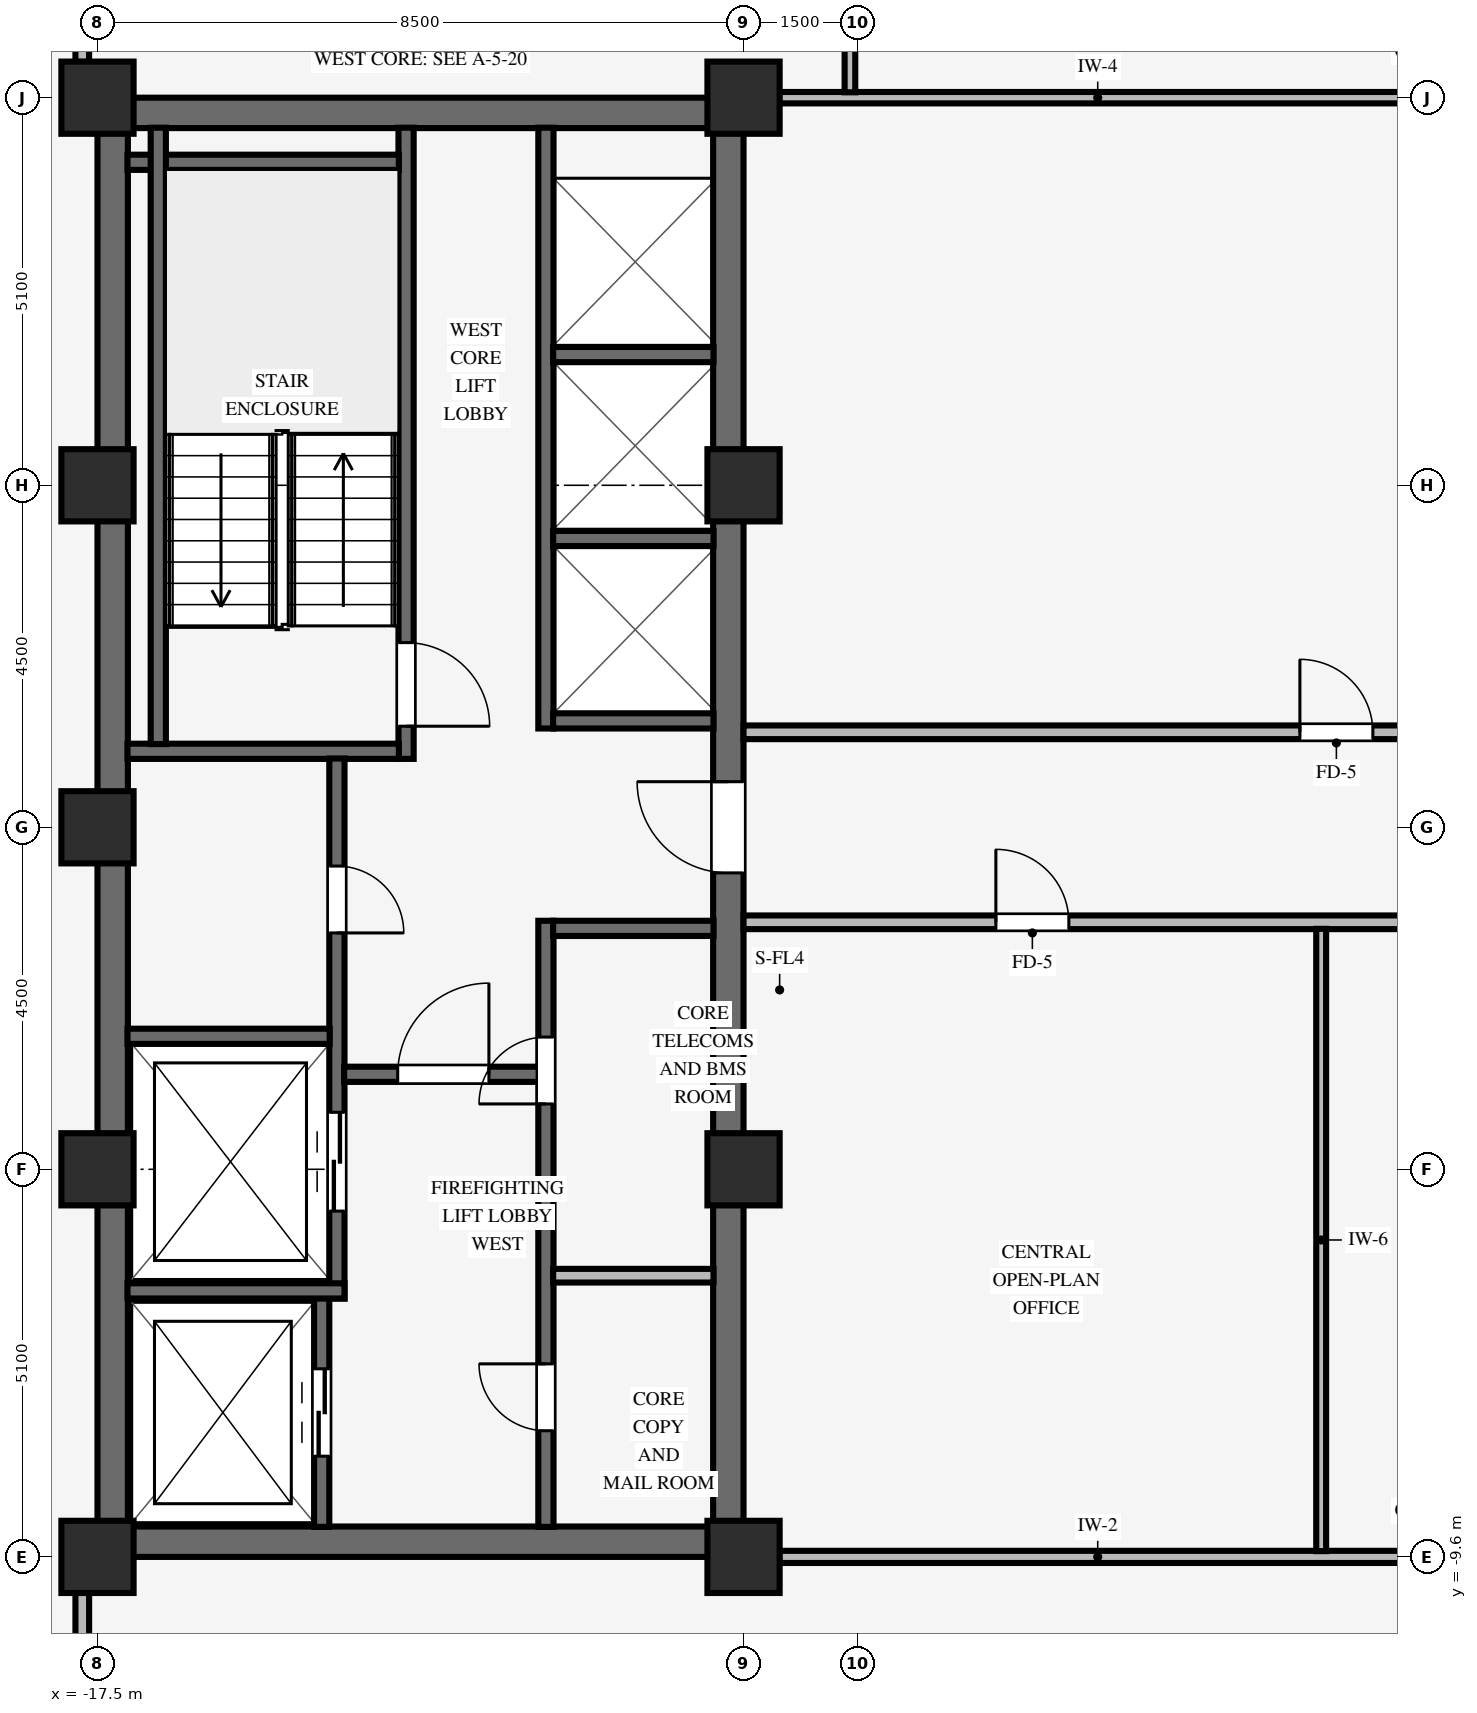
"""IFC4 building model, lengths in metres.
Left out: names, types, materials, properties, quantities, classifications, styles, units other than length and angle.
Written with IfcOpenShell. Run it as: python <this file> out.ifc"""

import sys

from ifc_helpers import new_model, si_unit, direction, frame, frame_2d, origin, origin_2d, place, context, subcontext, project, spatial, rectangle, extrude, source, transform, mapped, element, fill, save


model = new_model("IFC4")
c1 = context("Model", 3, precision=1e-05, world=origin(), true_north=direction((0.0, 1.0)))
c2 = subcontext(c1, "Body", "Model", "MODEL_VIEW")
j1 = project(units=[si_unit("LENGTHUNIT", "METRE"), si_unit("PLANEANGLEUNIT", "RADIAN")], contexts=[c1])
p1 = place(None, origin())
s1 = spatial("IfcSite", under=j1, at=p1, CompositionType="ELEMENT")
p2 = place(p1, origin())
s2 = spatial("IfcBuilding", under=s1, at=p2, CompositionType="ELEMENT")
p3 = place(p2, frame((0.0, 0.0, 171.3)))
s3 = spatial("IfcBuildingStorey", under=s2, at=p3, CompositionType="ELEMENT", Elevation=171.3)
for number, where, z_axis, x_axis in (
    (1, (-17.5, -9.4, 0.0), (0.0, 0.0, 1.0), (1.0, 0.0, 0.0)),
    (2, (-17.5, 9.4, 0.0), (0.0, 0.0, 1.0), (1.0, 0.0, 0.0)),
):
    element("IfcWall", number, at=place(p3, frame(where, z_axis=z_axis, x_axis=x_axis)), inside=s3, PredefinedType="SHEAR", context=c2, shape_type="SweptSolid", body=[
        extrude(rectangle(XDim=8.5, YDim=0.4, at=frame_2d((4.25, 0.0))), origin(), (0.0, 0.0, 1.0), 3.37),
    ])
p4 = place(p3, frame((-17.3, -9.205, 0.0), z_axis=(0.0, 0.0, 1.0), x_axis=(0.0, 1.0, 0.0)))
e3 = element("IfcWall", 3, at=p4, inside=s3, PredefinedType="SHEAR", context=c2, shape_type="SweptSolid", body=[
    extrude(rectangle(XDim=18.41, YDim=0.4, at=frame_2d((9.205, 0.0))), origin(), (0.0, 0.0, 1.0), 3.37),
])
p5 = place(p3, frame((-9.2, -9.205, 0.0), z_axis=(0.0, 0.0, 1.0), x_axis=(0.0, 1.0, 0.0)))
e4 = element("IfcWall", 4, at=p5, inside=s3, PredefinedType="SHEAR", context=c2, shape_type="SweptSolid", body=[
    extrude(rectangle(XDim=18.41, YDim=0.4, at=frame_2d((9.205, 0.0))), origin(), (0.0, 0.0, 1.0), 3.37),
])
p6 = place(p5, frame((8.605, 0.0, 0.0)))
e5 = element("IfcOpeningElement", 5, at=p6, cuts=e4, PredefinedType="OPENING", context=c2, shape_type="SweptSolid", body=[
    extrude(rectangle(XDim=1.2, YDim=2.15, at=frame_2d((0.6, 1.075))), frame((0.0, 0.21, 0.0), z_axis=(0.0, -1.0, 0.0), x_axis=(1.0, 0.0, 0.0)), (0.0, 0.0, 1.0), 0.42),
])
for number, where, z_axis, x_axis in (
    (6, (-17.5, -9.6, 0.0), (0.0, 0.0, 1.0), (1.0, 0.0, 0.0)),
    (7, (-17.5, -4.5, 0.0), (0.0, 0.0, 1.0), (1.0, 0.0, 0.0)),
    (8, (-17.5, 4.5, 0.0), (0.0, 0.0, 1.0), (1.0, 0.0, 0.0)),
    (9, (-17.5, 9.6, 0.0), (0.0, 0.0, 1.0), (1.0, 0.0, 0.0)),
    (10, (-9.0, -9.6, 0.0), (0.0, 0.0, 1.0), (1.0, 0.0, 0.0)),
    (11, (-9.0, -4.5, 0.0), (0.0, 0.0, 1.0), (1.0, 0.0, 0.0)),
    (12, (-9.0, 4.5, 0.0), (0.0, 0.0, 1.0), (1.0, 0.0, 0.0)),
    (13, (-9.0, 9.6, 0.0), (0.0, 0.0, 1.0), (1.0, 0.0, 0.0)),
    (14, (-17.5, 0.0, 0.0), (0.0, 0.0, 1.0), (1.0, 0.0, 0.0)),
):
    element("IfcColumn", number, at=place(p3, frame(where, z_axis=z_axis, x_axis=x_axis)), inside=s3, PredefinedType="COLUMN", context=c2, shape_type="SweptSolid", body=[
        extrude(rectangle(XDim=0.95, YDim=0.95, at=origin_2d()), origin(), (0.0, 0.0, 1.0), 3.37),
    ])
p7 = place(p3, frame((-13.44, 0.9, 0.0), z_axis=(0.0, 0.0, 1.0), x_axis=(0.0, 1.0, 0.0)))
e15 = element("IfcWall", 15, at=p7, inside=s3, PredefinedType="SHEAR", context=c2, shape_type="SweptSolid", body=[
    extrude(rectangle(XDim=8.305, YDim=0.2, at=frame_2d((4.153, 0.0))), origin(), (0.0, 0.0, 1.0), 3.37),
])
p8 = place(p7, frame((1.53, 0.0, 0.0), z_axis=(0.0, 0.0, 1.0), x_axis=(-1.0, 0.0, 0.0)))
e16 = element("IfcOpeningElement", 16, at=p8, cuts=e15, PredefinedType="OPENING", context=c2, shape_type="SweptSolid", body=[
    extrude(rectangle(XDim=1.1, YDim=2.15, at=frame_2d((0.55, 1.075))), frame((0.0, 0.11, 0.0), z_axis=(0.0, -1.0, 0.0), x_axis=(1.0, 0.0, 0.0)), (0.0, 0.0, 1.0), 0.22),
])
for number, where, z_axis, x_axis in (
    (17, (-17.105, 1.0, 0.0), (0.0, 0.0, 1.0), (1.0, 0.0, 0.0)),
    (18, (-17.105, 8.75, 0.0), (0.0, 0.0, 1.0), (1.0, 0.0, 0.0)),
):
    element("IfcWall", number, at=place(p3, frame(where, z_axis=z_axis, x_axis=x_axis)), inside=s3, PredefinedType="SHEAR", context=c2, shape_type="SweptSolid", body=[
        extrude(rectangle(XDim=3.57, YDim=0.2, at=frame_2d((1.785, 0.0))), origin(), (0.0, 0.0, 1.0), 3.37),
    ])
p9 = place(p3, frame((-16.7, 1.095, 0.0), z_axis=(0.0, 0.0, 1.0), x_axis=(0.0, 1.0, 0.0)))
e19 = element("IfcWall", 19, at=p9, inside=s3, PredefinedType="SHEAR", context=c2, shape_type="SweptSolid", body=[
    extrude(rectangle(XDim=8.11, YDim=0.2, at=frame_2d((4.055, 0.0))), origin(), (0.0, 0.0, 1.0), 3.37),
])
p10 = place(p3, frame((-14.55, -9.205, 0.0), z_axis=(0.0, 0.0, 1.0), x_axis=(0.0, 1.0, 0.0)))
e20 = element("IfcWall", 20, at=p10, inside=s3, PredefinedType="SHEAR", context=c2, shape_type="SweptSolid", body=[
    extrude(rectangle(XDim=3.01, YDim=0.2, at=frame_2d((1.505, 0.0))), origin(), (0.0, 0.0, 1.0), 3.37),
])
p11 = place(p10, frame((0.93, 0.0, 0.0)))
e21 = element("IfcOpeningElement", 21, at=p11, cuts=e20, PredefinedType="OPENING", context=c2, shape_type="SweptSolid", body=[
    extrude(rectangle(XDim=1.15, YDim=2.15, at=frame_2d((0.575, 1.075))), frame((0.0, 0.11, 0.0), z_axis=(0.0, -1.0, 0.0), x_axis=(1.0, 0.0, 0.0)), (0.0, 0.0, 1.0), 0.22),
])
p12 = place(p3, frame((-14.35, -6.2, 0.0), z_axis=(0.0, 0.0, 1.0), x_axis=(0.0, 1.0, 0.0)))
e22 = element("IfcWall", 22, at=p12, inside=s3, PredefinedType="SHEAR", context=c2, shape_type="SweptSolid", body=[
    extrude(rectangle(XDim=7.105, YDim=0.2, at=frame_2d((3.552, 0.0))), origin(), (0.0, 0.0, 1.0), 3.37),
])
p13 = place(p12, frame((5.69, 0.0, 0.0), z_axis=(0.0, 0.0, 1.0), x_axis=(-1.0, 0.0, 0.0)))
e23 = element("IfcOpeningElement", 23, at=p13, cuts=e22, PredefinedType="OPENING", context=c2, shape_type="SweptSolid", body=[
    extrude(rectangle(XDim=0.88, YDim=2.1, at=frame_2d((0.44, 1.05))), frame((0.0, 0.11, 0.0), z_axis=(0.0, -1.0, 0.0), x_axis=(1.0, 0.0, 0.0)), (0.0, 0.0, 1.0), 0.22),
])
p14 = place(p12, frame((1.15, 0.0, 0.0)))
e24 = element("IfcOpeningElement", 24, at=p14, cuts=e22, PredefinedType="OPENING", context=c2, shape_type="SweptSolid", body=[
    extrude(rectangle(XDim=1.3, YDim=2.2, at=frame_2d((0.65, 1.1))), frame((0.0, 0.11, 0.0), z_axis=(0.0, -1.0, 0.0), x_axis=(1.0, 0.0, 0.0)), (0.0, 0.0, 1.0), 0.22),
])
p15 = place(p3, frame((-17.105, -6.1, 0.0), z_axis=(0.0, 0.0, 1.0), x_axis=(1.0, 0.0, 0.0)))
e25 = element("IfcWall", 25, at=p15, inside=s3, PredefinedType="SHEAR", context=c2, shape_type="SweptSolid", body=[
    extrude(rectangle(XDim=2.855, YDim=0.2, at=frame_2d((1.427, 0.0))), origin(), (0.0, 0.0, 1.0), 3.37),
])
p16 = place(p3, frame((-17.105, -2.75, 0.0), z_axis=(0.0, 0.0, 1.0), x_axis=(1.0, 0.0, 0.0)))
e26 = element("IfcWall", 26, at=p16, inside=s3, PredefinedType="SHEAR", context=c2, shape_type="SweptSolid", body=[
    extrude(rectangle(XDim=2.66, YDim=0.2, at=frame_2d((1.33, 0.0))), origin(), (0.0, 0.0, 1.0), 3.37),
])
p17 = place(p3, frame((-11.6, -9.205, 0.0), z_axis=(0.0, 0.0, 1.0), x_axis=(0.0, 1.0, 0.0)))
e27 = element("IfcWall", 27, at=p17, inside=s3, PredefinedType="SHEAR", context=c2, shape_type="SweptSolid", body=[
    extrude(rectangle(XDim=7.975, YDim=0.2, at=frame_2d((3.988, 0.0))), origin(), (0.0, 0.0, 1.0), 3.37),
])
p18 = place(p17, frame((1.265, 0.0, 0.0)))
e28 = element("IfcOpeningElement", 28, at=p18, cuts=e27, PredefinedType="OPENING", context=c2, shape_type="SweptSolid", body=[
    extrude(rectangle(XDim=0.88, YDim=2.1, at=frame_2d((0.44, 1.05))), frame((0.0, 0.11, 0.0), z_axis=(0.0, -1.0, 0.0), x_axis=(1.0, 0.0, 0.0)), (0.0, 0.0, 1.0), 0.22),
])
p19 = place(p17, frame((5.565, 0.0, 0.0)))
e29 = element("IfcOpeningElement", 29, at=p19, cuts=e27, PredefinedType="OPENING", context=c2, shape_type="SweptSolid", body=[
    extrude(rectangle(XDim=0.88, YDim=2.1, at=frame_2d((0.44, 1.05))), frame((0.0, 0.11, 0.0), z_axis=(0.0, -1.0, 0.0), x_axis=(1.0, 0.0, 0.0)), (0.0, 0.0, 1.0), 0.22),
])
p20 = place(p3, frame((-14.255, -3.25, 0.0), z_axis=(0.0, 0.0, 1.0), x_axis=(1.0, 0.0, 0.0)))
e30 = element("IfcWall", 30, at=p20, inside=s3, PredefinedType="SHEAR", context=c2, shape_type="SweptSolid", body=[
    extrude(rectangle(XDim=2.56, YDim=0.2, at=frame_2d((1.28, 0.0))), origin(), (0.0, 0.0, 1.0), 3.37),
])
p21 = place(p20, frame((0.705, 0.0, 0.0)))
e31 = element("IfcOpeningElement", 31, at=p21, cuts=e30, PredefinedType="OPENING", context=c2, shape_type="SweptSolid", body=[
    extrude(rectangle(XDim=1.2, YDim=2.15, at=frame_2d((0.6, 1.075))), frame((0.0, 0.11, 0.0), z_axis=(0.0, -1.0, 0.0), x_axis=(1.0, 0.0, 0.0)), (0.0, 0.0, 1.0), 0.22),
])
p22 = place(p3, frame((-11.505, -1.33, 0.0), z_axis=(0.0, 0.0, 1.0), x_axis=(1.0, 0.0, 0.0)))
e32 = element("IfcWall", 32, at=p22, inside=s3, PredefinedType="SHEAR", context=c2, shape_type="SweptSolid", body=[
    extrude(rectangle(XDim=2.11, YDim=0.2, at=frame_2d((1.055, 0.0))), origin(), (0.0, 0.0, 1.0), 3.37),
])
p23 = place(p3, frame((-11.505, -5.9, 0.0), z_axis=(0.0, 0.0, 1.0), x_axis=(1.0, 0.0, 0.0)))
e33 = element("IfcWall", 33, at=p23, inside=s3, PredefinedType="PARTITIONING", context=c2, shape_type="SweptSolid", body=[
    extrude(rectangle(XDim=2.11, YDim=0.18, at=frame_2d((1.055, 0.0))), origin(), (0.0, 0.0, 1.0), 3.36),
])
p24 = place(p3, frame((-11.6, 1.3, 0.0), z_axis=(0.0, 0.0, 1.0), x_axis=(0.0, 1.0, 0.0)))
e34 = element("IfcWall", 34, at=p24, inside=s3, PredefinedType="SHEAR", context=c2, shape_type="SweptSolid", body=[
    extrude(rectangle(XDim=7.905, YDim=0.2, at=frame_2d((3.953, 0.0))), origin(), (0.0, 0.0, 1.0), 3.37),
])
for number, where, z_axis, x_axis in (
    (35, (-11.505, 1.4, 0.0), (0.0, 0.0, 1.0), (1.0, 0.0, 0.0)),
    (36, (-11.505, 3.8, 0.0), (0.0, 0.0, 1.0), (1.0, 0.0, 0.0)),
    (37, (-11.505, 6.22, 0.0), (0.0, 0.0, 1.0), (1.0, 0.0, 0.0)),
):
    element("IfcWall", number, at=place(p3, frame(where, z_axis=z_axis, x_axis=x_axis)), inside=s3, PredefinedType="SHEAR", context=c2, shape_type="SweptSolid", body=[
        extrude(rectangle(XDim=2.11, YDim=0.2, at=frame_2d((1.055, 0.0))), origin(), (0.0, 0.0, 1.0), 3.37),
    ])
p25 = place(p3, frame((-8.529, -9.6, 0.0), z_axis=(0.0, 0.0, 1.0), x_axis=(1.0, 0.0, 0.0)))
e38 = element("IfcWall", 38, at=p25, inside=s3, PredefinedType="PARTITIONING", context=c2, shape_type="SweptSolid", body=[
    extrude(rectangle(XDim=8.378, YDim=0.16, at=frame_2d((4.189, 0.0))), origin(), (0.0, 0.0, 1.0), 2.405),
])
p26 = place(p3, frame((-9.0, -1.25, 0.0), z_axis=(0.0, 0.0, 1.0), x_axis=(1.0, 0.0, 0.0)))
e39 = element("IfcWall", 39, at=p26, inside=s3, PredefinedType="PARTITIONING", context=c2, shape_type="SweptSolid", body=[
    extrude(rectangle(XDim=15.6, YDim=0.18, at=frame_2d((7.8, 0.0))), origin(), (0.0, 0.0, 1.0), 3.36),
])
p27 = place(p26, frame((3.32, 0.0, 0.0)))
e40 = element("IfcOpeningElement", 40, at=p27, cuts=e39, PredefinedType="OPENING", context=c2, shape_type="SweptSolid", body=[
    extrude(rectangle(XDim=0.96, YDim=2.1, at=frame_2d((0.48, 1.05))), frame((0.0, 0.1, 0.0), z_axis=(0.0, -1.0, 0.0), x_axis=(1.0, 0.0, 0.0)), (0.0, 0.0, 1.0), 0.2),
])
p28 = place(p3, frame((-9.0, 1.25, 0.0), z_axis=(0.0, 0.0, 1.0), x_axis=(1.0, 0.0, 0.0)))
e41 = element("IfcWall", 41, at=p28, inside=s3, PredefinedType="PARTITIONING", context=c2, shape_type="SweptSolid", body=[
    extrude(rectangle(XDim=15.6, YDim=0.18, at=frame_2d((7.8, 0.0))), origin(), (0.0, 0.0, 1.0), 3.36),
])
p29 = place(p28, frame((7.32, 0.0, 0.0)))
e42 = element("IfcOpeningElement", 42, at=p29, cuts=e41, PredefinedType="OPENING", context=c2, shape_type="SweptSolid", body=[
    extrude(rectangle(XDim=0.96, YDim=2.1, at=frame_2d((0.48, 1.05))), frame((0.0, 0.1, 0.0), z_axis=(0.0, -1.0, 0.0), x_axis=(1.0, 0.0, 0.0)), (0.0, 0.0, 1.0), 0.2),
])
p30 = place(p3, frame((-8.529, 9.6, 0.0), z_axis=(0.0, 0.0, 1.0), x_axis=(1.0, 0.0, 0.0)))
e43 = element("IfcWall", 43, at=p30, inside=s3, PredefinedType="PARTITIONING", context=c2, shape_type="SweptSolid", body=[
    extrude(rectangle(XDim=8.378, YDim=0.15, at=frame_2d((4.189, 0.0))), origin(), (0.0, 0.0, 1.0), 2.405),
])
for number, where, z_axis, x_axis in (
    (44, (-17.7, -13.414, 0.0), (0.0, 0.0, 1.0), (0.0, 1.0, 0.0)),
    (45, (-17.7, 10.071, 0.0), (0.0, 0.0, 1.0), (0.0, 1.0, 0.0)),
):
    element("IfcWall", number, at=place(p3, frame(where, z_axis=z_axis, x_axis=x_axis)), inside=s3, PredefinedType="PARTITIONING", context=c2, shape_type="SweptSolid", body=[
        extrude(rectangle(XDim=3.343, YDim=0.18, at=frame_2d((1.671, 0.0))), origin(), (0.0, 0.0, 1.0), 2.816),
    ])
p31 = place(p3, frame((-7.6, 9.671, 0.0), z_axis=(0.0, 0.0, 1.0), x_axis=(0.0, 1.0, 0.0)))
e46 = element("IfcWall", 46, at=p31, inside=s3, PredefinedType="PARTITIONING", context=c2, shape_type="SweptSolid", body=[
    extrude(rectangle(XDim=3.743, YDim=0.14, at=frame_2d((1.872, 0.0))), origin(), (0.0, 0.0, 1.0), 3.36),
])
p32 = place(p3, frame((-1.4, -9.524, 0.0), z_axis=(0.0, 0.0, 1.0), x_axis=(0.0, 1.0, 0.0)))
e47 = element("IfcWall", 47, at=p32, inside=s3, PredefinedType="PARTITIONING", context=c2, shape_type="SweptSolid", body=[
    extrude(rectangle(XDim=8.188, YDim=0.13, at=frame_2d((4.094, 0.0))), origin(), (0.0, 0.0, 1.0), 3.36),
])
m1 = source(origin(), c2, "Body", "SweptSolid", [
    extrude(rectangle(XDim=1.1, YDim=2.15, at=frame_2d((0.55, 1.075))), frame((0.0, 0.025, 0.0), z_axis=(0.0, -1.0, 0.0), x_axis=(1.0, 0.0, 0.0)), (0.0, 0.0, 1.0), 0.05),
])
p33 = place(p8, origin())
e48 = element("IfcDoor", 48, at=p33, inside=s3, OperationType="SINGLE_SWING_RIGHT", PredefinedType="DOOR", context=c2, shape_type="MappedRepresentation", body=[
    mapped(m1, transform((0.0, 0.0, 0.0), scale=1.0)),
])
fill(e16, e48)
m2 = source(origin(), c2, "Body", "SweptSolid", [
    extrude(rectangle(XDim=0.88, YDim=2.1, at=frame_2d((0.44, 1.05))), frame((0.0, 0.025, 0.0), z_axis=(0.0, -1.0, 0.0), x_axis=(1.0, 0.0, 0.0)), (0.0, 0.0, 1.0), 0.05),
])
p34 = place(p13, origin())
e49 = element("IfcDoor", 49, at=p34, inside=s3, OperationType="SINGLE_SWING_RIGHT", PredefinedType="DOOR", context=c2, shape_type="MappedRepresentation", body=[
    mapped(m2, transform((0.0, 0.0, 0.0), scale=1.0)),
])
fill(e23, e49)
m3 = source(origin(), c2, "Body", "SweptSolid", [
    extrude(rectangle(XDim=1.2, YDim=2.15, at=frame_2d((0.6, 1.075))), frame((0.0, 0.025, 0.0), z_axis=(0.0, -1.0, 0.0), x_axis=(1.0, 0.0, 0.0)), (0.0, 0.0, 1.0), 0.05),
])
p35 = place(p21, origin())
e50 = element("IfcDoor", 50, at=p35, inside=s3, OperationType="SINGLE_SWING_RIGHT", PredefinedType="DOOR", context=c2, shape_type="MappedRepresentation", body=[
    mapped(m3, transform((0.0, 0.0, 0.0), scale=1.0)),
])
fill(e31, e50)
p36 = place(p18, origin())
e51 = element("IfcDoor", 51, at=p36, inside=s3, OperationType="SINGLE_SWING_RIGHT", PredefinedType="DOOR", context=c2, shape_type="MappedRepresentation", body=[
    mapped(m2, transform((0.0, 0.0, 0.0), scale=1.0)),
])
fill(e28, e51)
p37 = place(p19, origin())
e52 = element("IfcDoor", 52, at=p37, inside=s3, OperationType="SINGLE_SWING_LEFT", PredefinedType="DOOR", context=c2, shape_type="MappedRepresentation", body=[
    mapped(m2, transform((0.0, 0.0, 0.0), scale=1.0)),
])
fill(e29, e52)
p38 = place(p6, origin())
e53 = element("IfcDoor", 53, at=p38, inside=s3, OperationType="SINGLE_SWING_RIGHT", PredefinedType="DOOR", context=c2, shape_type="MappedRepresentation", body=[
    mapped(m3, transform((0.0, 0.0, 0.0), scale=1.0)),
])
fill(e5, e53)
m4 = source(origin(), c2, "Body", "SweptSolid", [
    extrude(rectangle(XDim=1.15, YDim=2.15, at=frame_2d((0.575, 1.075))), frame((0.0, 0.025, 0.0), z_axis=(0.0, -1.0, 0.0), x_axis=(1.0, 0.0, 0.0)), (0.0, 0.0, 1.0), 0.05),
])
p39 = place(p11, origin())
e54 = element("IfcDoor", 54, at=p39, inside=s3, OperationType="DOUBLE_DOOR_SLIDING", PredefinedType="DOOR", context=c2, shape_type="MappedRepresentation", body=[
    mapped(m4, transform((0.0, 0.0, 0.0), scale=1.0)),
])
fill(e21, e54)
m5 = source(origin(), c2, "Body", "SweptSolid", [
    extrude(rectangle(XDim=1.3, YDim=2.2, at=frame_2d((0.65, 1.1))), frame((0.0, 0.025, 0.0), z_axis=(0.0, -1.0, 0.0), x_axis=(1.0, 0.0, 0.0)), (0.0, 0.0, 1.0), 0.05),
])
p40 = place(p14, origin())
e55 = element("IfcDoor", 55, at=p40, inside=s3, OperationType="DOUBLE_DOOR_SLIDING", PredefinedType="DOOR", context=c2, shape_type="MappedRepresentation", body=[
    mapped(m5, transform((0.0, 0.0, 0.0), scale=1.0)),
])
fill(e24, e55)
m6 = source(origin(), c2, "Body", "SweptSolid", [
    extrude(rectangle(XDim=0.96, YDim=2.1, at=frame_2d((0.48, 1.05))), frame((0.0, 0.025, 0.0), z_axis=(0.0, -1.0, 0.0), x_axis=(1.0, 0.0, 0.0)), (0.0, 0.0, 1.0), 0.05),
])
p41 = place(p29, origin())
e56 = element("IfcDoor", 56, at=p41, inside=s3, OperationType="SINGLE_SWING_LEFT", PredefinedType="DOOR", context=c2, shape_type="MappedRepresentation", body=[
    mapped(m6, transform((0.0, 0.0, 0.0), scale=1.0)),
])
fill(e42, e56)
p42 = place(p27, origin())
e57 = element("IfcDoor", 57, at=p42, inside=s3, OperationType="SINGLE_SWING_LEFT", PredefinedType="DOOR", context=c2, shape_type="MappedRepresentation", body=[
    mapped(m6, transform((0.0, 0.0, 0.0), scale=1.0)),
])
fill(e40, e57)
save(model, sys.argv[1])
